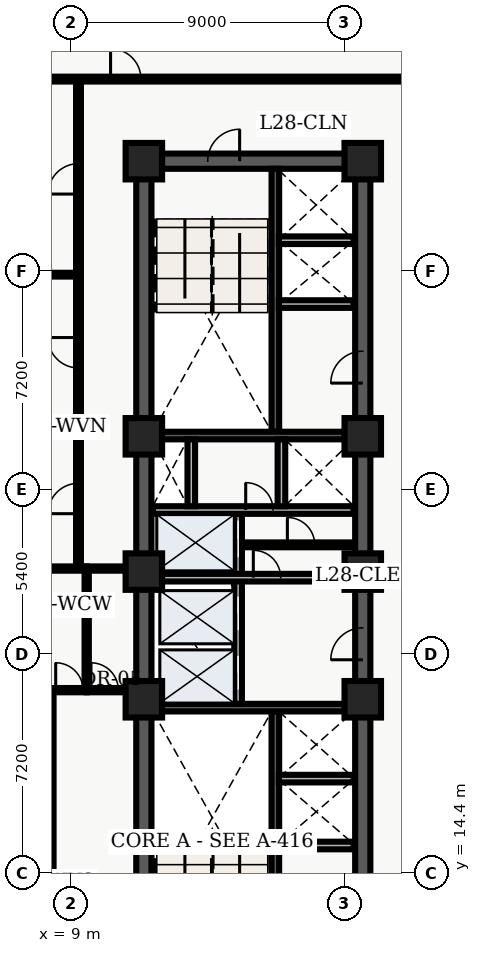
"""IFC4 building model, lengths in metres.
Left out: names, types, materials, properties, quantities, classifications, styles, units other than length and angle.
Written with IfcOpenShell. Run it as: python <this file> out.ifc"""

import sys

from ifc_helpers import new_model, entity, si_unit, converted_unit, direction, frame, origin_with_axes, origin_2d_with_axis, place, context, subcontext, project, spatial, polyline, rectangle, outline, extrude, element, fill, save


model = new_model("IFC4")
c1 = context("Model", 3, precision=1e-05, world=origin_with_axes(), true_north=direction((0.0, 1.0)))
c2 = subcontext(c1, "Body", "Model", "MODEL_VIEW")
j1 = project(units=[si_unit("LENGTHUNIT", "METRE"), converted_unit("PLANEANGLEUNIT", "DEGREE", entity("IfcPlaneAngleMeasure", 0.017), si_unit("PLANEANGLEUNIT", "RADIAN"), dimensions=[0, 0, 0, 0, 0, 0, 0])], contexts=[c1])
p1 = place(None, origin_with_axes())
s1 = spatial("IfcSite", under=j1, at=p1, CompositionType="ELEMENT")
p2 = place(p1, origin_with_axes())
s2 = spatial("IfcBuilding", under=s1, at=p2, CompositionType="ELEMENT")
p3 = place(p2, frame((0.0, 0.0, 116.4), z_axis=(0.0, 0.0, 1.0), x_axis=(1.0, 0.0, 0.0)))
s3 = spatial("IfcBuildingStorey", under=s2, at=p3, CompositionType="ELEMENT", Elevation=116.4)
p4 = place(p3, frame((11.4, 10.8, 0.0), z_axis=(0.0, 0.0, 1.0), x_axis=(0.0, 1.0, 0.0)))
e1 = element("IfcWall", 1, at=p4, inside=s3, PredefinedType="SHEAR", context=c2, shape_type="SweptSolid", body=[
    extrude(outline(polyline([(0.0, -0.25), (27.0, -0.25), (27.0, 0.25), (0.0, 0.25), (0.0, -0.25)])), origin_with_axes(), (0.0, 0.0, 1.0), 3.66),
])
p5 = place(p3, frame((11.4, 37.8, 0.0), z_axis=(0.0, 0.0, 1.0), x_axis=(1.0, 0.0, 0.0)))
e2 = element("IfcWall", 2, at=p5, inside=s3, PredefinedType="SHEAR", context=c2, shape_type="SweptSolid", body=[
    extrude(outline(polyline([(0.0, -0.25), (7.2, -0.25), (7.2, 0.25), (0.0, 0.25), (0.0, -0.25)])), origin_with_axes(), (0.0, 0.0, 1.0), 3.66),
])
p6 = place(p5, frame((2.625, 0.0, 0.0), z_axis=(0.0, 0.0, 1.0), x_axis=(1.0, 0.0, 0.0)))
e3 = element("IfcOpeningElement", 3, at=p6, cuts=e2, PredefinedType="OPENING", context=c2, shape_type="SweptSolid", body=[
    extrude(rectangle(XDim=1.05, YDim=0.52, at=origin_2d_with_axis()), origin_with_axes(), (0.0, 0.0, 1.0), 2.15),
])
p7 = place(p3, frame((18.6, 10.8, 0.0), z_axis=(0.0, 0.0, 1.0), x_axis=(0.0, 1.0, 0.0)))
e4 = element("IfcWall", 4, at=p7, inside=s3, PredefinedType="SHEAR", context=c2, shape_type="SweptSolid", body=[
    extrude(outline(polyline([(0.0, -0.25), (13.5, -0.25), (13.5, 0.25), (0.0, 0.25), (0.0, -0.25)])), origin_with_axes(), (0.0, 0.0, 1.0), 3.66),
])
p8 = place(p7, frame((11.125, 0.0, 0.0), z_axis=(0.0, 0.0, 1.0), x_axis=(1.0, 0.0, 0.0)))
e5 = element("IfcOpeningElement", 5, at=p8, cuts=e4, PredefinedType="OPENING", context=c2, shape_type="SweptSolid", body=[
    extrude(rectangle(XDim=1.05, YDim=0.52, at=origin_2d_with_axis()), origin_with_axes(), (0.0, 0.0, 1.0), 2.15),
])
p9 = place(p7, frame((2.325, 0.0, 0.0), z_axis=(0.0, 0.0, 1.0), x_axis=(1.0, 0.0, 0.0)))
e6 = element("IfcOpeningElement", 6, at=p9, cuts=e4, PredefinedType="OPENING", context=c2, shape_type="SweptSolid", body=[
    extrude(rectangle(XDim=0.95, YDim=0.52, at=origin_2d_with_axis()), origin_with_axes(), (0.0, 0.0, 1.0), 2.15),
])
p10 = place(p3, frame((18.6, 24.3, 0.0), z_axis=(0.0, 0.0, 1.0), x_axis=(0.0, 1.0, 0.0)))
e7 = element("IfcWall", 7, at=p10, inside=s3, PredefinedType="SHEAR", context=c2, shape_type="SweptSolid", body=[
    extrude(outline(polyline([(0.0, -0.25), (13.5, -0.25), (13.5, 0.25), (0.0, 0.25), (0.0, -0.25)])), origin_with_axes(), (0.0, 0.0, 1.0), 3.66),
])
p11 = place(p10, frame((6.725, 0.0, 0.0), z_axis=(0.0, 0.0, 1.0), x_axis=(1.0, 0.0, 0.0)))
e8 = element("IfcOpeningElement", 8, at=p11, cuts=e7, PredefinedType="OPENING", context=c2, shape_type="SweptSolid", body=[
    extrude(rectangle(XDim=1.05, YDim=0.52, at=origin_2d_with_axis()), origin_with_axes(), (0.0, 0.0, 1.0), 2.15),
])
p12 = place(p3, frame((15.725, 11.05, 0.0), z_axis=(0.0, 0.0, 1.0), x_axis=(0.0, 1.0, 0.0)))
e9 = element("IfcWall", 9, at=p12, inside=s3, PredefinedType="SHEAR", context=c2, shape_type="SweptSolid", body=[
    extrude(outline(polyline([(0.0, -0.125), (8.65, -0.125), (8.65, 0.125), (0.0, 0.125), (0.0, -0.125)])), origin_with_axes(), (0.0, 0.0, 1.0), 3.66),
])
p13 = place(p3, frame((11.65, 19.825, 0.0), z_axis=(0.0, 0.0, 1.0), x_axis=(1.0, 0.0, 0.0)))
e10 = element("IfcWall", 10, at=p13, inside=s3, PredefinedType="SHEAR", context=c2, shape_type="SweptSolid", body=[
    extrude(outline(polyline([(0.0, -0.125), (6.7, -0.125), (6.7, 0.125), (0.0, 0.125), (0.0, -0.125)])), origin_with_axes(), (0.0, 0.0, 1.0), 3.66),
])
p14 = place(p3, frame((15.725, 28.9, 0.0), z_axis=(0.0, 0.0, 1.0), x_axis=(0.0, 1.0, 0.0)))
e11 = element("IfcWall", 11, at=p14, inside=s3, PredefinedType="SHEAR", context=c2, shape_type="SweptSolid", body=[
    extrude(outline(polyline([(0.0, -0.125), (8.65, -0.125), (8.65, 0.125), (0.0, 0.125), (0.0, -0.125)])), origin_with_axes(), (0.0, 0.0, 1.0), 3.66),
])
p15 = place(p3, frame((11.65, 28.775, 0.0), z_axis=(0.0, 0.0, 1.0), x_axis=(1.0, 0.0, 0.0)))
e12 = element("IfcWall", 12, at=p15, inside=s3, PredefinedType="SHEAR", context=c2, shape_type="SweptSolid", body=[
    extrude(outline(polyline([(0.0, -0.125), (6.7, -0.125), (6.7, 0.125), (0.0, 0.125), (0.0, -0.125)])), origin_with_axes(), (0.0, 0.0, 1.0), 3.66),
])
p16 = place(p3, frame((14.5, 19.95, 0.0), z_axis=(0.0, 0.0, 1.0), x_axis=(0.0, 1.0, 0.0)))
e13 = element("IfcWall", 13, at=p16, inside=s3, PredefinedType="SOLIDWALL", context=c2, shape_type="SweptSolid", body=[
    extrude(outline(polyline([(0.0, -0.125), (6.25, -0.125), (6.25, 0.125), (0.0, 0.125), (0.0, -0.125)])), origin_with_axes(), (0.0, 0.0, 1.0), 2.7),
])
p17 = place(p16, frame((1.025, 0.0, 0.0), z_axis=(0.0, 0.0, 1.0), x_axis=(1.0, 0.0, 0.0)))
e14 = element("IfcOpeningElement", 14, at=p17, cuts=e13, PredefinedType="OPENING", context=c2, shape_type="SweptSolid", body=[
    extrude(rectangle(XDim=1.1, YDim=0.27, at=origin_2d_with_axis()), origin_with_axes(), (0.0, 0.0, 1.0), 2.15),
])
p18 = place(p16, frame((2.975, 0.0, 0.0), z_axis=(0.0, 0.0, 1.0), x_axis=(1.0, 0.0, 0.0)))
e15 = element("IfcOpeningElement", 15, at=p18, cuts=e13, PredefinedType="OPENING", context=c2, shape_type="SweptSolid", body=[
    extrude(rectangle(XDim=1.1, YDim=0.27, at=origin_2d_with_axis()), origin_with_axes(), (0.0, 0.0, 1.0), 2.15),
])
p19 = place(p16, frame((5.425, 0.0, 0.0), z_axis=(0.0, 0.0, 1.0), x_axis=(1.0, 0.0, 0.0)))
e16 = element("IfcOpeningElement", 16, at=p19, cuts=e13, PredefinedType="OPENING", context=c2, shape_type="SweptSolid", body=[
    extrude(rectangle(XDim=1.2, YDim=0.27, at=origin_2d_with_axis()), origin_with_axes(), (0.0, 0.0, 1.0), 2.15),
])
p20 = place(p3, frame((11.7, 24.1, 0.0), z_axis=(0.0, 0.0, 1.0), x_axis=(1.0, 0.0, 0.0)))
e17 = element("IfcWall", 17, at=p20, inside=s3, PredefinedType="SOLIDWALL", context=c2, shape_type="SweptSolid", body=[
    extrude(outline(polyline([(0.0, -0.125), (6.6, -0.125), (6.6, 0.125), (0.0, 0.125), (0.0, -0.125)])), origin_with_axes(), (0.0, 0.0, 1.0), 2.7),
])
p21 = place(p20, frame((3.75, 0.0, 0.0), z_axis=(0.0, 0.0, 1.0), x_axis=(1.0, 0.0, 0.0)))
e18 = element("IfcOpeningElement", 18, at=p21, cuts=e17, PredefinedType="OPENING", context=c2, shape_type="SweptSolid", body=[
    extrude(rectangle(XDim=0.9, YDim=0.27, at=origin_2d_with_axis()), origin_with_axes(), (0.0, 0.0, 1.0), 2.15),
])
p22 = place(p3, frame((11.7, 26.325, 0.0), z_axis=(0.0, 0.0, 1.0), x_axis=(1.0, 0.0, 0.0)))
e19 = element("IfcWall", 19, at=p22, inside=s3, PredefinedType="SOLIDWALL", context=c2, shape_type="SweptSolid", body=[
    extrude(outline(polyline([(0.0, -0.125), (6.6, -0.125), (6.6, 0.125), (0.0, 0.125), (0.0, -0.125)])), origin_with_axes(), (0.0, 0.0, 1.0), 2.7),
])
p23 = place(p22, frame((3.5, 0.0, 0.0), z_axis=(0.0, 0.0, 1.0), x_axis=(1.0, 0.0, 0.0)))
e20 = element("IfcOpeningElement", 20, at=p23, cuts=e19, PredefinedType="OPENING", context=c2, shape_type="SweptSolid", body=[
    extrude(rectangle(XDim=0.9, YDim=0.27, at=origin_2d_with_axis()), origin_with_axes(), (0.0, 0.0, 1.0), 2.15),
])
for number, where, z_axis, x_axis in (
    (21, (12.96, 26.45, 0.0), (0.0, 0.0, 1.0), (0.0, 1.0, 0.0)),
    (22, (15.925, 26.45, 0.0), (0.0, 0.0, 1.0), (0.0, 1.0, 0.0)),
):
    element("IfcWall", number, at=place(p3, frame(where, z_axis=z_axis, x_axis=x_axis)), inside=s3, PredefinedType="SOLIDWALL", context=c2, shape_type="SweptSolid", body=[
        extrude(outline(polyline([(0.0, -0.125), (2.2, -0.125), (2.2, 0.125), (0.0, 0.125), (0.0, -0.125)])), origin_with_axes(), (0.0, 0.0, 1.0), 2.7),
    ])
for number, where, z_axis, x_axis in (
    (23, (11.4, 20.1, 0.0), (0.0, 0.0, 1.0), (1.0, 0.0, 0.0)),
    (24, (11.4, 24.3, 0.0), (0.0, 0.0, 1.0), (1.0, 0.0, 0.0)),
    (25, (11.4, 28.75, 0.0), (0.0, 0.0, 1.0), (1.0, 0.0, 0.0)),
    (26, (11.4, 37.8, 0.0), (0.0, 0.0, 1.0), (1.0, 0.0, 0.0)),
    (27, (18.6, 20.1, 0.0), (0.0, 0.0, 1.0), (1.0, 0.0, 0.0)),
    (28, (18.6, 24.3, 0.0), (0.0, 0.0, 1.0), (1.0, 0.0, 0.0)),
    (29, (18.6, 28.75, 0.0), (0.0, 0.0, 1.0), (1.0, 0.0, 0.0)),
    (30, (18.6, 37.8, 0.0), (0.0, 0.0, 1.0), (1.0, 0.0, 0.0)),
):
    element("IfcColumn", number, at=place(p3, frame(where, z_axis=z_axis, x_axis=x_axis)), inside=s3, PredefinedType="COLUMN", context=c2, shape_type="SweptSolid", body=[
        extrude(rectangle(XDim=1.2, YDim=1.2, at=origin_2d_with_axis()), origin_with_axes(), (0.0, 0.0, 1.0), 3.9),
    ])
p24 = place(p3, frame((14.62, 25.18, 0.0), z_axis=(0.0, 0.0, 1.0), x_axis=(1.0, 0.0, 0.0)))
e31 = element("IfcWall", 31, at=p24, inside=s3, PredefinedType="PARTITIONING", context=c2, shape_type="SweptSolid", body=[
    extrude(outline(polyline([(0.0, -0.08), (3.68, -0.08), (3.68, 0.08), (0.0, 0.08), (0.0, -0.08)])), origin_with_axes(), (0.0, 0.0, 1.0), 2.7),
])
p25 = place(p24, frame((1.95, 0.0, 0.0), z_axis=(0.0, 0.0, 1.0), x_axis=(1.0, 0.0, 0.0)))
e32 = element("IfcOpeningElement", 32, at=p25, cuts=e31, PredefinedType="OPENING", context=c2, shape_type="SweptSolid", body=[
    extrude(rectangle(XDim=0.9, YDim=0.18, at=origin_2d_with_axis()), origin_with_axes(), (0.0, 0.0, 1.0), 2.15),
])
for number, where, z_axis, x_axis in (
    (33, (15.84, 15.29, 0.0), (0.0, 0.0, 1.0), (1.0, 0.0, 0.0)),
    (34, (15.84, 17.49, 0.0), (0.0, 0.0, 1.0), (1.0, 0.0, 0.0)),
    (35, (15.84, 33.1, 0.0), (0.0, 0.0, 1.0), (1.0, 0.0, 0.0)),
    (36, (15.84, 35.2, 0.0), (0.0, 0.0, 1.0), (1.0, 0.0, 0.0)),
):
    element("IfcWall", number, at=place(p3, frame(where, z_axis=z_axis, x_axis=x_axis)), inside=s3, PredefinedType="SOLIDWALL", context=c2, shape_type="SweptSolid", body=[
        extrude(outline(polyline([(0.0, -0.125), (2.46, -0.125), (2.46, 0.125), (0.0, 0.125), (0.0, -0.125)])), origin_with_axes(), (0.0, 0.0, 1.0), 2.7),
    ])
p26 = place(p3, frame((9.52, 20.4, 0.0), z_axis=(0.0, 0.0, 1.0), x_axis=(0.0, 1.0, 0.0)))
e37 = element("IfcWall", 37, at=p26, inside=s3, PredefinedType="PARTITIONING", context=c2, shape_type="SweptSolid", body=[
    extrude(outline(polyline([(0.0, -0.07), (4.0, -0.07), (4.0, 0.07), (0.0, 0.07), (0.0, -0.07)])), origin_with_axes(), (0.0, 0.0, 1.0), 2.7),
])
p27 = place(p3, frame((9.52, 20.4, 0.0), z_axis=(0.0, 0.0, 1.0), x_axis=(1.0, 0.0, 0.0)))
e38 = element("IfcWall", 38, at=p27, inside=s3, PredefinedType="PARTITIONING", context=c2, shape_type="SweptSolid", body=[
    extrude(outline(polyline([(0.0, -0.07), (1.58, -0.07), (1.58, 0.07), (0.0, 0.07), (0.0, -0.07)])), origin_with_axes(), (0.0, 0.0, 1.0), 2.7),
])
p28 = place(p27, frame((0.59, 0.0, 0.0), z_axis=(0.0, 0.0, 1.0), x_axis=(1.0, 0.0, 0.0)))
e39 = element("IfcOpeningElement", 39, at=p28, cuts=e38, PredefinedType="OPENING", context=c2, shape_type="SweptSolid", body=[
    extrude(rectangle(XDim=0.9, YDim=0.16, at=origin_2d_with_axis()), origin_with_axes(), (0.0, 0.0, 1.0), 2.15),
])
p29 = place(p3, frame((9.52, 24.4, 0.0), z_axis=(0.0, 0.0, 1.0), x_axis=(1.0, 0.0, 0.0)))
e40 = element("IfcWall", 40, at=p29, inside=s3, PredefinedType="PARTITIONING", context=c2, shape_type="SweptSolid", body=[
    extrude(outline(polyline([(0.0, -0.07), (1.58, -0.07), (1.58, 0.07), (0.0, 0.07), (0.0, -0.07)])), origin_with_axes(), (0.0, 0.0, 1.0), 2.7),
])
p30 = place(p3, frame((2.6, 40.5, 0.0), z_axis=(0.0, 0.0, 1.0), x_axis=(1.0, 0.0, 0.0)))
e41 = element("IfcWall", 41, at=p30, inside=s3, PredefinedType="PARTITIONING", context=c2, shape_type="SweptSolid", body=[
    extrude(outline(polyline([(0.0, -0.08), (18.65, -0.08), (18.65, 0.08), (0.0, 0.08), (0.0, -0.08)])), origin_with_axes(), (0.0, 0.0, 1.0), 2.7),
])
p31 = place(p30, frame((8.205, 0.0, 0.0), z_axis=(0.0, 0.0, 1.0), x_axis=(1.0, 0.0, 0.0)))
e42 = element("IfcOpeningElement", 42, at=p31, cuts=e41, PredefinedType="OPENING", context=c2, shape_type="SweptSolid", body=[
    extrude(rectangle(XDim=1.0, YDim=0.18, at=origin_2d_with_axis()), origin_with_axes(), (0.0, 0.0, 1.0), 2.15),
])
p32 = place(p3, frame((8.35, 7.8, 0.0), z_axis=(0.0, 0.0, 1.0), x_axis=(0.0, 1.0, 0.0)))
e43 = element("IfcWall", 43, at=p32, inside=s3, PredefinedType="PARTITIONING", context=c2, shape_type="SweptSolid", body=[
    extrude(outline(polyline([(0.0, -0.08), (12.6, -0.08), (12.6, 0.08), (0.0, 0.08), (0.0, -0.08)])), origin_with_axes(), (0.0, 0.0, 1.0), 2.7),
])
p33 = place(p32, frame((2.93, 0.0, 0.0), z_axis=(0.0, 0.0, 1.0), x_axis=(1.0, 0.0, 0.0)))
e44 = element("IfcOpeningElement", 44, at=p33, cuts=e43, PredefinedType="OPENING", context=c2, shape_type="SweptSolid", body=[
    extrude(rectangle(XDim=1.0, YDim=0.18, at=origin_2d_with_axis()), origin_with_axes(), (0.0, 0.0, 1.0), 2.15),
])
p34 = place(p32, frame((9.126, 0.0, 0.0), z_axis=(0.0, 0.0, 1.0), x_axis=(1.0, 0.0, 0.0)))
e45 = element("IfcOpeningElement", 45, at=p34, cuts=e43, PredefinedType="OPENING", context=c2, shape_type="SweptSolid", body=[
    extrude(rectangle(XDim=1.0, YDim=0.18, at=origin_2d_with_axis()), origin_with_axes(), (0.0, 0.0, 1.0), 2.15),
])
p35 = place(p3, frame((9.25, 24.4, 0.0), z_axis=(0.0, 0.0, 1.0), x_axis=(0.0, 1.0, 0.0)))
e46 = element("IfcWall", 46, at=p35, inside=s3, PredefinedType="PARTITIONING", context=c2, shape_type="SweptSolid", body=[
    extrude(outline(polyline([(0.0, -0.08), (16.1, -0.08), (16.1, 0.08), (0.0, 0.08), (0.0, -0.08)])), origin_with_axes(), (0.0, 0.0, 1.0), 2.7),
])
p36 = place(p35, frame((2.305, 0.0, 0.0), z_axis=(0.0, 0.0, 1.0), x_axis=(1.0, 0.0, 0.0)))
e47 = element("IfcOpeningElement", 47, at=p36, cuts=e46, PredefinedType="OPENING", context=c2, shape_type="SweptSolid", body=[
    extrude(rectangle(XDim=1.0, YDim=0.18, at=origin_2d_with_axis()), origin_with_axes(), (0.0, 0.0, 1.0), 2.15),
])
p37 = place(p35, frame((7.098, 0.0, 0.0), z_axis=(0.0, 0.0, 1.0), x_axis=(1.0, 0.0, 0.0)))
e48 = element("IfcOpeningElement", 48, at=p37, cuts=e46, PredefinedType="OPENING", context=c2, shape_type="SweptSolid", body=[
    extrude(rectangle(XDim=1.0, YDim=0.18, at=origin_2d_with_axis()), origin_with_axes(), (0.0, 0.0, 1.0), 2.15),
])
p38 = place(p35, frame((12.819, 0.0, 0.0), z_axis=(0.0, 0.0, 1.0), x_axis=(1.0, 0.0, 0.0)))
e49 = element("IfcOpeningElement", 49, at=p38, cuts=e46, PredefinedType="OPENING", context=c2, shape_type="SweptSolid", body=[
    extrude(rectangle(XDim=1.0, YDim=0.18, at=origin_2d_with_axis()), origin_with_axes(), (0.0, 0.0, 1.0), 2.15),
])
p39 = place(p3, frame((0.36, 20.4, 0.0), z_axis=(0.0, 0.0, 1.0), x_axis=(1.0, 0.0, 0.0)))
e50 = element("IfcWall", 50, at=p39, inside=s3, PredefinedType="PARTITIONING", context=c2, shape_type="SweptSolid", body=[
    extrude(outline(polyline([(0.0, -0.07), (9.16, -0.07), (9.16, 0.07), (0.0, 0.07), (0.0, -0.07)])), origin_with_axes(), (0.0, 0.0, 1.0), 2.7),
])
p40 = place(p39, frame((8.59, 0.0, 0.0), z_axis=(0.0, 0.0, 1.0), x_axis=(1.0, 0.0, 0.0)))
e51 = element("IfcOpeningElement", 51, at=p40, cuts=e50, PredefinedType="OPENING", context=c2, shape_type="SweptSolid", body=[
    extrude(rectangle(XDim=0.9, YDim=0.16, at=origin_2d_with_axis()), origin_with_axes(), (0.0, 0.0, 1.0), 2.15),
])
p41 = place(p3, frame((0.36, 24.4, 0.0), z_axis=(0.0, 0.0, 1.0), x_axis=(1.0, 0.0, 0.0)))
e52 = element("IfcWall", 52, at=p41, inside=s3, PredefinedType="PARTITIONING", context=c2, shape_type="SweptSolid", body=[
    extrude(outline(polyline([(0.0, -0.07), (9.16, -0.07), (9.16, 0.07), (0.0, 0.07), (0.0, -0.07)])), origin_with_axes(), (0.0, 0.0, 1.0), 2.7),
])
p42 = place(p3, frame((0.375, 28.93, 0.0), z_axis=(0.0, 0.0, 1.0), x_axis=(1.0, 0.0, 0.0)))
e53 = element("IfcWall", 53, at=p42, inside=s3, PredefinedType="PARTITIONING", context=c2, shape_type="SweptSolid", body=[
    extrude(outline(polyline([(0.0, -0.14), (8.755, -0.14), (8.755, 0.14), (0.0, 0.14), (0.0, -0.14)])), origin_with_axes(), (0.0, 0.0, 1.0), 2.7),
])
p43 = place(p3, frame((0.375, 34.067, 0.0), z_axis=(0.0, 0.0, 1.0), x_axis=(1.0, 0.0, 0.0)))
e54 = element("IfcWall", 54, at=p43, inside=s3, PredefinedType="PARTITIONING", context=c2, shape_type="SweptSolid", body=[
    extrude(outline(polyline([(0.0, -0.062), (8.755, -0.062), (8.755, 0.062), (0.0, 0.062), (0.0, -0.062)])), origin_with_axes(), (0.0, 0.0, 1.0), 2.7),
])
p44 = place(p16, frame((1.025, 0.0, 0.0), z_axis=(0.0, 0.0, 1.0), x_axis=(1.0, 0.0, 0.0)))
e55 = element("IfcDoor", 55, at=p44, inside=s3, OperationType="SLIDING_TO_LEFT", PredefinedType="DOOR", context=c2, shape_type="SweptSolid", body=[
    extrude(rectangle(XDim=1.1, YDim=0.09, at=origin_2d_with_axis()), origin_with_axes(), (0.0, 0.0, 1.0), 2.15),
])
fill(e14, e55)
p45 = place(p16, frame((2.975, 0.0, 0.0), z_axis=(0.0, 0.0, 1.0), x_axis=(1.0, 0.0, 0.0)))
e56 = element("IfcDoor", 56, at=p45, inside=s3, OperationType="SLIDING_TO_RIGHT", PredefinedType="DOOR", context=c2, shape_type="SweptSolid", body=[
    extrude(rectangle(XDim=1.1, YDim=0.09, at=origin_2d_with_axis()), origin_with_axes(), (0.0, 0.0, 1.0), 2.15),
])
fill(e15, e56)
p46 = place(p16, frame((5.425, 0.0, 0.0), z_axis=(0.0, 0.0, 1.0), x_axis=(1.0, 0.0, 0.0)))
e57 = element("IfcDoor", 57, at=p46, inside=s3, OperationType="DOUBLE_DOOR_SLIDING", PredefinedType="DOOR", context=c2, shape_type="SweptSolid", body=[
    extrude(rectangle(XDim=1.2, YDim=0.09, at=origin_2d_with_axis()), origin_with_axes(), (0.0, 0.0, 1.0), 2.15),
])
fill(e16, e57)
p47 = place(p5, frame((2.625, 0.0, 0.0), z_axis=(0.0, 0.0, 1.0), x_axis=(1.0, 0.0, 0.0)))
e58 = element("IfcDoor", 58, at=p47, inside=s3, OperationType="SINGLE_SWING_RIGHT", PredefinedType="DOOR", context=c2, shape_type="SweptSolid", body=[
    extrude(rectangle(XDim=1.05, YDim=0.09, at=origin_2d_with_axis()), origin_with_axes(), (0.0, 0.0, 1.0), 2.15),
])
fill(e3, e58)
p48 = place(p7, frame((11.125, 0.0, 0.0), z_axis=(0.0, 0.0, 1.0), x_axis=(1.0, 0.0, 0.0)))
e59 = element("IfcDoor", 59, at=p48, inside=s3, OperationType="SINGLE_SWING_LEFT", PredefinedType="DOOR", context=c2, shape_type="SweptSolid", body=[
    extrude(rectangle(XDim=1.05, YDim=0.09, at=origin_2d_with_axis()), origin_with_axes(), (0.0, 0.0, 1.0), 2.15),
])
fill(e5, e59)
p49 = place(p22, frame((3.5, 0.0, 0.0), z_axis=(0.0, 0.0, 1.0), x_axis=(1.0, 0.0, 0.0)))
e60 = element("IfcDoor", 60, at=p49, inside=s3, OperationType="SINGLE_SWING_LEFT", PredefinedType="DOOR", context=c2, shape_type="SweptSolid", body=[
    extrude(rectangle(XDim=0.9, YDim=0.09, at=origin_2d_with_axis()), origin_with_axes(), (0.0, 0.0, 1.0), 2.15),
])
fill(e20, e60)
p50 = place(p20, frame((3.75, 0.0, 0.0), z_axis=(0.0, 0.0, 1.0), x_axis=(1.0, 0.0, 0.0)))
e61 = element("IfcDoor", 61, at=p50, inside=s3, OperationType="SINGLE_SWING_LEFT", PredefinedType="DOOR", context=c2, shape_type="SweptSolid", body=[
    extrude(rectangle(XDim=0.9, YDim=0.09, at=origin_2d_with_axis()), origin_with_axes(), (0.0, 0.0, 1.0), 2.15),
])
fill(e18, e61)
p51 = place(p24, frame((1.95, 0.0, 0.0), z_axis=(0.0, 0.0, 1.0), x_axis=(1.0, 0.0, 0.0)))
e62 = element("IfcDoor", 62, at=p51, inside=s3, OperationType="SINGLE_SWING_LEFT", PredefinedType="DOOR", context=c2, shape_type="SweptSolid", body=[
    extrude(rectangle(XDim=0.9, YDim=0.09, at=origin_2d_with_axis()), origin_with_axes(), (0.0, 0.0, 1.0), 2.15),
])
fill(e32, e62)
p52 = place(p10, frame((6.725, 0.0, 0.0), z_axis=(0.0, 0.0, 1.0), x_axis=(1.0, 0.0, 0.0)))
e63 = element("IfcDoor", 63, at=p52, inside=s3, OperationType="SINGLE_SWING_LEFT", PredefinedType="DOOR", context=c2, shape_type="SweptSolid", body=[
    extrude(rectangle(XDim=1.05, YDim=0.09, at=origin_2d_with_axis()), origin_with_axes(), (0.0, 0.0, 1.0), 2.15),
])
fill(e8, e63)
p53 = place(p27, frame((0.59, 0.0, 0.0), z_axis=(0.0, 0.0, 1.0), x_axis=(1.0, 0.0, 0.0)))
e64 = element("IfcDoor", 64, at=p53, inside=s3, OperationType="SINGLE_SWING_LEFT", PredefinedType="DOOR", context=c2, shape_type="SweptSolid", body=[
    extrude(rectangle(XDim=0.9, YDim=0.084, at=origin_2d_with_axis()), origin_with_axes(), (0.0, 0.0, 1.0), 2.15),
])
fill(e39, e64)
p54 = place(p39, frame((8.59, 0.0, 0.0), z_axis=(0.0, 0.0, 1.0), x_axis=(1.0, 0.0, 0.0)))
e65 = element("IfcDoor", 65, at=p54, inside=s3, OperationType="SINGLE_SWING_LEFT", PredefinedType="DOOR", context=c2, shape_type="SweptSolid", body=[
    extrude(rectangle(XDim=0.9, YDim=0.084, at=origin_2d_with_axis()), origin_with_axes(), (0.0, 0.0, 1.0), 2.15),
])
fill(e51, e65)
p55 = place(p32, frame((9.126, 0.0, 0.0), z_axis=(0.0, 0.0, 1.0), x_axis=(1.0, 0.0, 0.0)))
e66 = element("IfcDoor", 66, at=p55, inside=s3, OperationType="SINGLE_SWING_RIGHT", PredefinedType="DOOR", context=c2, shape_type="SweptSolid", body=[
    extrude(rectangle(XDim=1.0, YDim=0.09, at=origin_2d_with_axis()), origin_with_axes(), (0.0, 0.0, 1.0), 2.15),
])
fill(e45, e66)
p56 = place(p35, frame((2.305, 0.0, 0.0), z_axis=(0.0, 0.0, 1.0), x_axis=(1.0, 0.0, 0.0)))
e67 = element("IfcDoor", 67, at=p56, inside=s3, OperationType="SINGLE_SWING_LEFT", PredefinedType="DOOR", context=c2, shape_type="SweptSolid", body=[
    extrude(rectangle(XDim=1.0, YDim=0.09, at=origin_2d_with_axis()), origin_with_axes(), (0.0, 0.0, 1.0), 2.15),
])
fill(e47, e67)
p57 = place(p35, frame((7.098, 0.0, 0.0), z_axis=(0.0, 0.0, 1.0), x_axis=(1.0, 0.0, 0.0)))
e68 = element("IfcDoor", 68, at=p57, inside=s3, OperationType="SINGLE_SWING_RIGHT", PredefinedType="DOOR", context=c2, shape_type="SweptSolid", body=[
    extrude(rectangle(XDim=1.0, YDim=0.09, at=origin_2d_with_axis()), origin_with_axes(), (0.0, 0.0, 1.0), 2.15),
])
fill(e48, e68)
p58 = place(p35, frame((12.819, 0.0, 0.0), z_axis=(0.0, 0.0, 1.0), x_axis=(1.0, 0.0, 0.0)))
e69 = element("IfcDoor", 69, at=p58, inside=s3, OperationType="SINGLE_SWING_LEFT", PredefinedType="DOOR", context=c2, shape_type="SweptSolid", body=[
    extrude(rectangle(XDim=1.0, YDim=0.09, at=origin_2d_with_axis()), origin_with_axes(), (0.0, 0.0, 1.0), 2.15),
])
fill(e49, e69)
p59 = place(p30, frame((8.205, 0.0, 0.0), z_axis=(0.0, 0.0, 1.0), x_axis=(1.0, 0.0, 0.0)))
e70 = element("IfcDoor", 70, at=p59, inside=s3, OperationType="SINGLE_SWING_LEFT", PredefinedType="DOOR", context=c2, shape_type="SweptSolid", body=[
    extrude(rectangle(XDim=1.0, YDim=0.09, at=origin_2d_with_axis()), origin_with_axes(), (0.0, 0.0, 1.0), 2.15),
])
fill(e42, e70)
save(model, sys.argv[1])
